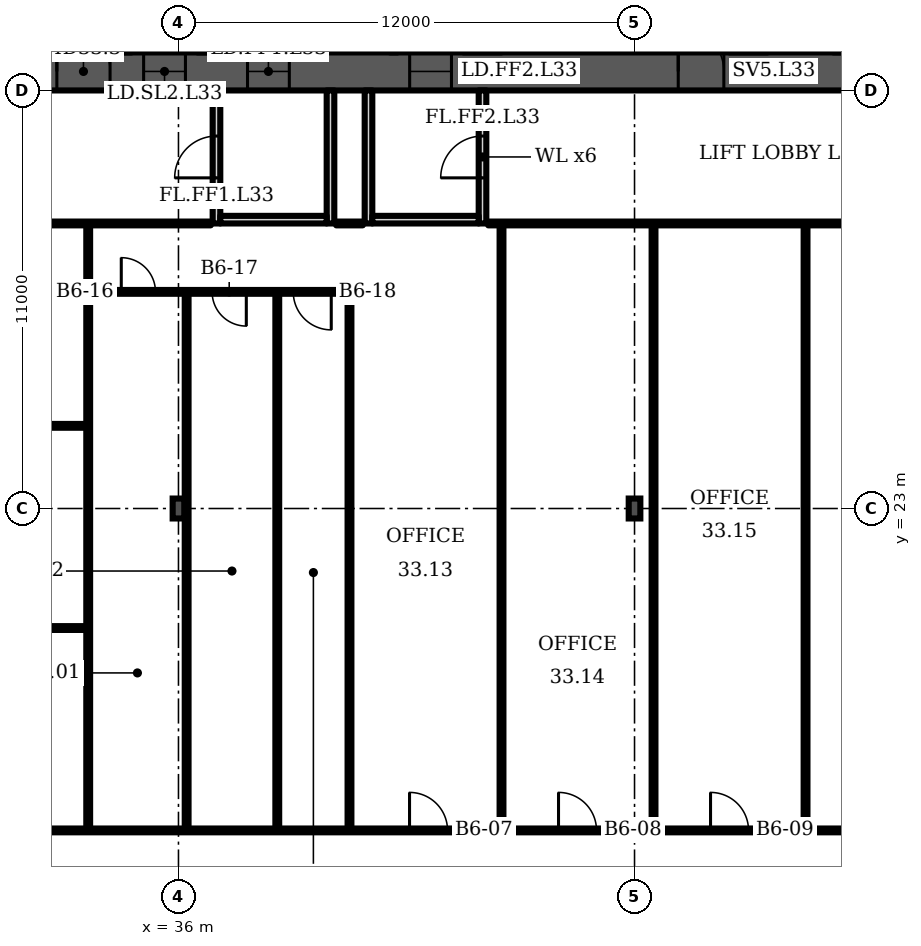
"""IFC4 building model, lengths in metres.
Left out: names, types, materials, properties, quantities, classifications, styles, units other than length and angle.
Written with IfcOpenShell. Run it as: python <this file> out.ifc"""

import sys

from ifc_helpers import new_model, si_unit, direction, frame, frame_2d, origin, origin_2d, place, context, subcontext, project, spatial, rectangle, i_section, extrude, element, fill, save


model = new_model("IFC4")
c1 = context("Model", 3, precision=1e-05, world=origin(), true_north=direction((0.0, 1.0)))
c2 = subcontext(c1, "Body", "Model", "MODEL_VIEW")
j1 = project(units=[si_unit("LENGTHUNIT", "METRE"), si_unit("PLANEANGLEUNIT", "RADIAN")], contexts=[c1])
p1 = place(None, origin())
s1 = spatial("IfcSite", under=j1, at=p1, CompositionType="ELEMENT")
p2 = place(p1, origin())
s2 = spatial("IfcBuilding", under=s1, at=p2, CompositionType="ELEMENT")
p3 = place(p2, frame((0.0, 0.0, 139.9)))
s3 = spatial("IfcBuildingStorey", under=s2, at=p3, CompositionType="ELEMENT", Elevation=139.9)
p4 = place(p3, frame((16.0, 34.5, 0.0), z_axis=(0.0, 0.0, 1.0), x_axis=(1.0, 0.0, 0.0)))
e1 = element("IfcWall", 1, at=p4, inside=s3, PredefinedType="SHEAR", context=c2, shape_type="SweptSolid", body=[
    extrude(rectangle(XDim=49.0, YDim=1.0, at=frame_2d((24.5, 0.0))), origin(), (0.0, 0.0, 1.0), 3.6),
])
p5 = place(p4, frame((1.2, 0.0, 0.0)))
e2 = element("IfcOpeningElement", 2, at=p5, cuts=e1, PredefinedType="OPENING", context=c2, shape_type="SweptSolid", body=[
    extrude(rectangle(XDim=1.1, YDim=2.1, at=frame_2d((0.55, 1.05))), frame((0.0, 0.51, 0.0), z_axis=(0.0, -1.0, 0.0), x_axis=(1.0, 0.0, 0.0)), (0.0, 0.0, 1.0), 1.02),
])
p6 = place(p4, frame((5.083, 0.0, 0.0)))
e3 = element("IfcOpeningElement", 3, at=p6, cuts=e1, PredefinedType="OPENING", context=c2, shape_type="SweptSolid", body=[
    extrude(rectangle(XDim=1.1, YDim=2.1, at=frame_2d((0.55, 1.05))), frame((0.0, 0.51, 0.0), z_axis=(0.0, -1.0, 0.0), x_axis=(1.0, 0.0, 0.0)), (0.0, 0.0, 1.0), 1.02),
])
p7 = place(p4, frame((2.933, 0.0, 0.0)))
e4 = element("IfcOpeningElement", 4, at=p7, cuts=e1, PredefinedType="OPENING", context=c2, shape_type="SweptSolid", body=[
    extrude(rectangle(XDim=1.4, YDim=2.1, at=frame_2d((0.7, 1.05))), frame((0.0, 0.51, 0.0), z_axis=(0.0, -1.0, 0.0), x_axis=(1.0, 0.0, 0.0)), (0.0, 0.0, 1.0), 1.02),
])
p8 = place(p4, frame((7.65, 0.0, 0.0)))
e5 = element("IfcOpeningElement", 5, at=p8, cuts=e1, PredefinedType="OPENING", context=c2, shape_type="SweptSolid", body=[
    extrude(rectangle(XDim=1.2, YDim=2.1, at=frame_2d((0.6, 1.05))), frame((0.0, 0.51, 0.0), z_axis=(0.0, -1.0, 0.0), x_axis=(1.0, 0.0, 0.0)), (0.0, 0.0, 1.0), 1.02),
])
p9 = place(p4, frame((14.817, 0.0, 0.0)))
e6 = element("IfcOpeningElement", 6, at=p9, cuts=e1, PredefinedType="OPENING", context=c2, shape_type="SweptSolid", body=[
    extrude(rectangle(XDim=1.1, YDim=2.1, at=frame_2d((0.55, 1.05))), frame((0.0, 0.51, 0.0), z_axis=(0.0, -1.0, 0.0), x_axis=(1.0, 0.0, 0.0)), (0.0, 0.0, 1.0), 1.02),
])
p10 = place(p4, frame((19.083, 0.0, 0.0)))
e7 = element("IfcOpeningElement", 7, at=p10, cuts=e1, PredefinedType="OPENING", context=c2, shape_type="SweptSolid", body=[
    extrude(rectangle(XDim=1.1, YDim=2.1, at=frame_2d((0.55, 1.05))), frame((0.0, 0.51, 0.0), z_axis=(0.0, -1.0, 0.0), x_axis=(1.0, 0.0, 0.0)), (0.0, 0.0, 1.0), 1.02),
])
p11 = place(p4, frame((16.8, 0.0, 0.0)))
e8 = element("IfcOpeningElement", 8, at=p11, cuts=e1, PredefinedType="OPENING", context=c2, shape_type="SweptSolid", body=[
    extrude(rectangle(XDim=1.4, YDim=2.1, at=frame_2d((0.7, 1.05))), frame((0.0, 0.51, 0.0), z_axis=(0.0, -1.0, 0.0), x_axis=(1.0, 0.0, 0.0)), (0.0, 0.0, 1.0), 1.02),
])
p12 = place(p4, frame((21.817, 0.0, 0.0)))
e9 = element("IfcOpeningElement", 9, at=p12, cuts=e1, PredefinedType="OPENING", context=c2, shape_type="SweptSolid", body=[
    extrude(rectangle(XDim=1.1, YDim=2.1, at=frame_2d((0.55, 1.05))), frame((0.0, 0.51, 0.0), z_axis=(0.0, -1.0, 0.0), x_axis=(1.0, 0.0, 0.0)), (0.0, 0.0, 1.0), 1.02),
])
p13 = place(p4, frame((26.083, 0.0, 0.0)))
e10 = element("IfcOpeningElement", 10, at=p13, cuts=e1, PredefinedType="OPENING", context=c2, shape_type="SweptSolid", body=[
    extrude(rectangle(XDim=1.1, YDim=2.1, at=frame_2d((0.55, 1.05))), frame((0.0, 0.51, 0.0), z_axis=(0.0, -1.0, 0.0), x_axis=(1.0, 0.0, 0.0)), (0.0, 0.0, 1.0), 1.02),
])
p14 = place(p4, frame((33.15, 0.0, 0.0)))
e11 = element("IfcOpeningElement", 11, at=p14, cuts=e1, PredefinedType="OPENING", context=c2, shape_type="SweptSolid", body=[
    extrude(rectangle(XDim=1.2, YDim=2.1, at=frame_2d((0.6, 1.05))), frame((0.0, 0.51, 0.0), z_axis=(0.0, -1.0, 0.0), x_axis=(1.0, 0.0, 0.0)), (0.0, 0.0, 1.0), 1.02),
])
p15 = place(p4, frame((37.8, 0.0, 0.0)))
e12 = element("IfcOpeningElement", 12, at=p15, cuts=e1, PredefinedType="OPENING", context=c2, shape_type="SweptSolid", body=[
    extrude(rectangle(XDim=1.4, YDim=2.1, at=frame_2d((0.7, 1.05))), frame((0.0, 0.51, 0.0), z_axis=(0.0, -1.0, 0.0), x_axis=(1.0, 0.0, 0.0)), (0.0, 0.0, 1.0), 1.02),
])
p16 = place(p4, frame((42.817, 0.0, 0.0)))
e13 = element("IfcOpeningElement", 13, at=p16, cuts=e1, PredefinedType="OPENING", context=c2, shape_type="SweptSolid", body=[
    extrude(rectangle(XDim=1.1, YDim=2.1, at=frame_2d((0.55, 1.05))), frame((0.0, 0.51, 0.0), z_axis=(0.0, -1.0, 0.0), x_axis=(1.0, 0.0, 0.0)), (0.0, 0.0, 1.0), 1.02),
])
p17 = place(p4, frame((46.7, 0.0, 0.0)))
e14 = element("IfcOpeningElement", 14, at=p17, cuts=e1, PredefinedType="OPENING", context=c2, shape_type="SweptSolid", body=[
    extrude(rectangle(XDim=1.1, YDim=2.1, at=frame_2d((0.55, 1.05))), frame((0.0, 0.51, 0.0), z_axis=(0.0, -1.0, 0.0), x_axis=(1.0, 0.0, 0.0)), (0.0, 0.0, 1.0), 1.02),
])
p18 = place(p4, frame((44.667, 0.0, 0.0)))
e15 = element("IfcOpeningElement", 15, at=p18, cuts=e1, PredefinedType="OPENING", context=c2, shape_type="SweptSolid", body=[
    extrude(rectangle(XDim=1.4, YDim=2.1, at=frame_2d((0.7, 1.05))), frame((0.0, 0.51, 0.0), z_axis=(0.0, -1.0, 0.0), x_axis=(1.0, 0.0, 0.0)), (0.0, 0.0, 1.0), 1.02),
])
for number, where, z_axis, x_axis in (
    (16, (36.0, 23.0, 0.0), (0.0, 0.0, 1.0), (1.0, 0.0, 0.0)),
    (17, (48.0, 23.0, 0.0), (0.0, 0.0, 1.0), (1.0, 0.0, 0.0)),
):
    element("IfcColumn", number, at=place(p3, frame(where, z_axis=z_axis, x_axis=x_axis)), inside=s3, PredefinedType="COLUMN", context=c2, shape_type="SweptSolid", body=[
        extrude(i_section(OverallWidth=0.306, OverallDepth=0.524, WebThickness=0.021, FlangeThickness=0.04, FilletRadius=0.027, at=origin_2d()), origin(), (0.0, 0.0, 1.0), 3.6),
    ])
p19 = place(p3, frame((37.0, 30.5, 0.0), z_axis=(0.0, 0.0, 1.0), x_axis=(0.0, 1.0, 0.0)))
e18 = element("IfcWall", 18, at=p19, inside=s3, PredefinedType="PARTITIONING", context=c2, shape_type="SweptSolid", body=[
    extrude(rectangle(XDim=3.5, YDim=0.2, at=frame_2d((1.75, 0.0))), origin(), (0.0, 0.0, 1.0), 3.2),
])
p20 = place(p19, frame((1.2, 0.0, 0.0)))
e19 = element("IfcOpeningElement", 19, at=p20, cuts=e18, PredefinedType="OPENING", context=c2, shape_type="SweptSolid", body=[
    extrude(rectangle(XDim=1.1, YDim=2.1, at=frame_2d((0.55, 1.05))), frame((0.0, 0.11, 0.0), z_axis=(0.0, -1.0, 0.0), x_axis=(1.0, 0.0, 0.0)), (0.0, 0.0, 1.0), 0.22),
])
p21 = place(p3, frame((40.0, 30.5, 0.0), z_axis=(0.0, 0.0, 1.0), x_axis=(0.0, 1.0, 0.0)))
e20 = element("IfcWall", 20, at=p21, inside=s3, PredefinedType="PARTITIONING", context=c2, shape_type="SweptSolid", body=[
    extrude(rectangle(XDim=3.5, YDim=0.2, at=frame_2d((1.75, 0.0))), origin(), (0.0, 0.0, 1.0), 3.2),
])
p22 = place(p3, frame((37.1, 30.6, 0.0), z_axis=(0.0, 0.0, 1.0), x_axis=(1.0, 0.0, 0.0)))
e21 = element("IfcWall", 21, at=p22, inside=s3, PredefinedType="PARTITIONING", context=c2, shape_type="SweptSolid", body=[
    extrude(rectangle(XDim=2.8, YDim=0.2, at=frame_2d((1.4, 0.0))), origin(), (0.0, 0.0, 1.0), 3.2),
])
p23 = place(p3, frame((41.0, 30.5, 0.0), z_axis=(0.0, 0.0, 1.0), x_axis=(0.0, 1.0, 0.0)))
e22 = element("IfcWall", 22, at=p23, inside=s3, PredefinedType="PARTITIONING", context=c2, shape_type="SweptSolid", body=[
    extrude(rectangle(XDim=3.5, YDim=0.2, at=frame_2d((1.75, 0.0))), origin(), (0.0, 0.0, 1.0), 3.2),
])
p24 = place(p3, frame((44.0, 30.5, 0.0), z_axis=(0.0, 0.0, 1.0), x_axis=(0.0, 1.0, 0.0)))
e23 = element("IfcWall", 23, at=p24, inside=s3, PredefinedType="PARTITIONING", context=c2, shape_type="SweptSolid", body=[
    extrude(rectangle(XDim=3.5, YDim=0.2, at=frame_2d((1.75, 0.0))), origin(), (0.0, 0.0, 1.0), 3.2),
])
p25 = place(p24, frame((1.2, 0.0, 0.0)))
e24 = element("IfcOpeningElement", 24, at=p25, cuts=e23, PredefinedType="OPENING", context=c2, shape_type="SweptSolid", body=[
    extrude(rectangle(XDim=1.1, YDim=2.1, at=frame_2d((0.55, 1.05))), frame((0.0, 0.11, 0.0), z_axis=(0.0, -1.0, 0.0), x_axis=(1.0, 0.0, 0.0)), (0.0, 0.0, 1.0), 0.22),
])
p26 = place(p3, frame((41.1, 30.6, 0.0), z_axis=(0.0, 0.0, 1.0), x_axis=(1.0, 0.0, 0.0)))
e25 = element("IfcWall", 25, at=p26, inside=s3, PredefinedType="PARTITIONING", context=c2, shape_type="SweptSolid", body=[
    extrude(rectangle(XDim=2.8, YDim=0.2, at=frame_2d((1.4, 0.0))), origin(), (0.0, 0.0, 1.0), 3.2),
])
p27 = place(p3, frame((17.8, 25.175, 0.0), z_axis=(0.0, 0.0, 1.0), x_axis=(1.0, 0.0, 0.0)))
e26 = element("IfcWall", 26, at=p27, inside=s3, PredefinedType="PARTITIONING", context=c2, shape_type="SweptSolid", body=[
    extrude(rectangle(XDim=15.825, YDim=0.1, at=frame_2d((7.913, 0.0))), origin(), (0.0, 0.0, 1.0), 3.2),
])
p28 = place(p3, frame((17.8, 30.5, 0.0), z_axis=(0.0, 0.0, 1.0), x_axis=(1.0, 0.0, 0.0)))
e27 = element("IfcWall", 27, at=p28, inside=s3, PredefinedType="PARTITIONING", context=c2, shape_type="SweptSolid", body=[
    extrude(rectangle(XDim=19.05, YDim=0.1, at=frame_2d((9.525, 0.0))), origin(), (0.0, 0.0, 1.0), 3.2),
])
p29 = place(p28, frame((7.5, 0.0, 0.0)))
e28 = element("IfcOpeningElement", 28, at=p29, cuts=e27, PredefinedType="OPENING", context=c2, shape_type="SweptSolid", body=[
    extrude(rectangle(XDim=1.0, YDim=2.1, at=frame_2d((0.5, 1.05))), frame((0.0, 0.06, 0.0), z_axis=(0.0, -1.0, 0.0), x_axis=(1.0, 0.0, 0.0)), (0.0, 0.0, 1.0), 0.12),
])
p30 = place(p3, frame((18.2, 14.53, 0.0), z_axis=(0.0, 0.0, 1.0), x_axis=(1.0, 0.0, 0.0)))
e29 = element("IfcWall", 29, at=p30, inside=s3, PredefinedType="PARTITIONING", context=c2, shape_type="SweptSolid", body=[
    extrude(rectangle(XDim=68.41, YDim=0.1, at=frame_2d((34.205, 0.0))), origin(), (0.0, 0.0, 1.0), 3.2),
])
p31 = place(p30, frame((4.605, 0.0, 0.0)))
e30 = element("IfcOpeningElement", 30, at=p31, cuts=e29, PredefinedType="OPENING", context=c2, shape_type="SweptSolid", body=[
    extrude(rectangle(XDim=1.0, YDim=2.1, at=frame_2d((0.5, 1.05))), frame((0.0, 0.06, 0.0), z_axis=(0.0, -1.0, 0.0), x_axis=(1.0, 0.0, 0.0)), (0.0, 0.0, 1.0), 0.12),
])
p32 = place(p30, frame((23.88, 0.0, 0.0)))
e31 = element("IfcOpeningElement", 31, at=p32, cuts=e29, PredefinedType="OPENING", context=c2, shape_type="SweptSolid", body=[
    extrude(rectangle(XDim=1.0, YDim=2.1, at=frame_2d((0.5, 1.05))), frame((0.0, 0.06, 0.0), z_axis=(0.0, -1.0, 0.0), x_axis=(1.0, 0.0, 0.0)), (0.0, 0.0, 1.0), 0.12),
])
p33 = place(p30, frame((27.8, 0.0, 0.0)))
e32 = element("IfcOpeningElement", 32, at=p33, cuts=e29, PredefinedType="OPENING", context=c2, shape_type="SweptSolid", body=[
    extrude(rectangle(XDim=1.0, YDim=2.1, at=frame_2d((0.5, 1.05))), frame((0.0, 0.06, 0.0), z_axis=(0.0, -1.0, 0.0), x_axis=(1.0, 0.0, 0.0)), (0.0, 0.0, 1.0), 0.12),
])
p34 = place(p30, frame((31.8, 0.0, 0.0)))
e33 = element("IfcOpeningElement", 33, at=p34, cuts=e29, PredefinedType="OPENING", context=c2, shape_type="SweptSolid", body=[
    extrude(rectangle(XDim=1.0, YDim=2.1, at=frame_2d((0.5, 1.05))), frame((0.0, 0.06, 0.0), z_axis=(0.0, -1.0, 0.0), x_axis=(1.0, 0.0, 0.0)), (0.0, 0.0, 1.0), 0.12),
])
p35 = place(p30, frame((35.8, 0.0, 0.0)))
e34 = element("IfcOpeningElement", 34, at=p35, cuts=e29, PredefinedType="OPENING", context=c2, shape_type="SweptSolid", body=[
    extrude(rectangle(XDim=1.0, YDim=2.1, at=frame_2d((0.5, 1.05))), frame((0.0, 0.06, 0.0), z_axis=(0.0, -1.0, 0.0), x_axis=(1.0, 0.0, 0.0)), (0.0, 0.0, 1.0), 0.12),
])
p36 = place(p30, frame((41.355, 0.0, 0.0)))
e35 = element("IfcOpeningElement", 35, at=p36, cuts=e29, PredefinedType="OPENING", context=c2, shape_type="SweptSolid", body=[
    extrude(rectangle(XDim=1.0, YDim=2.1, at=frame_2d((0.5, 1.05))), frame((0.0, 0.06, 0.0), z_axis=(0.0, -1.0, 0.0), x_axis=(1.0, 0.0, 0.0)), (0.0, 0.0, 1.0), 0.12),
])
p37 = place(p30, frame((50.88, 0.0, 0.0)))
e36 = element("IfcOpeningElement", 36, at=p37, cuts=e29, PredefinedType="OPENING", context=c2, shape_type="SweptSolid", body=[
    extrude(rectangle(XDim=1.8, YDim=2.1, at=frame_2d((0.9, 1.05))), frame((0.0, 0.06, 0.0), z_axis=(0.0, -1.0, 0.0), x_axis=(1.0, 0.0, 0.0)), (0.0, 0.0, 1.0), 0.12),
])
p38 = place(p30, frame((62.796, 0.0, 0.0)))
e37 = element("IfcOpeningElement", 37, at=p38, cuts=e29, PredefinedType="OPENING", context=c2, shape_type="SweptSolid", body=[
    extrude(rectangle(XDim=1.0, YDim=2.1, at=frame_2d((0.5, 1.05))), frame((0.0, 0.06, 0.0), z_axis=(0.0, -1.0, 0.0), x_axis=(1.0, 0.0, 0.0)), (0.0, 0.0, 1.0), 0.12),
])
p39 = place(p3, frame((18.2, 19.855, 0.0), z_axis=(0.0, 0.0, 1.0), x_axis=(1.0, 0.0, 0.0)))
e38 = element("IfcWall", 38, at=p39, inside=s3, PredefinedType="PARTITIONING", context=c2, shape_type="SweptSolid", body=[
    extrude(rectangle(XDim=15.425, YDim=0.1, at=frame_2d((7.712, 0.0))), origin(), (0.0, 0.0, 1.0), 3.2),
])
p40 = place(p3, frame((33.625, 14.53, 0.0), z_axis=(0.0, 0.0, 1.0), x_axis=(0.0, 1.0, 0.0)))
e39 = element("IfcWall", 39, at=p40, inside=s3, PredefinedType="PARTITIONING", context=c2, shape_type="SweptSolid", body=[
    extrude(rectangle(XDim=15.96, YDim=0.1, at=frame_2d((7.98, 0.0))), origin(), (0.0, 0.0, 1.0), 3.2),
])
p41 = place(p3, frame((33.625, 28.7, 0.0), z_axis=(0.0, 0.0, 1.0), x_axis=(1.0, 0.0, 0.0)))
e40 = element("IfcWall", 40, at=p41, inside=s3, PredefinedType="PARTITIONING", context=c2, shape_type="SweptSolid", body=[
    extrude(rectangle(XDim=6.875, YDim=0.1, at=frame_2d((3.438, 0.0))), origin(), (0.0, 0.0, 1.0), 3.2),
])
p42 = place(p41, frame((0.87, 0.0, 0.0)))
e41 = element("IfcOpeningElement", 41, at=p42, cuts=e40, PredefinedType="OPENING", context=c2, shape_type="SweptSolid", body=[
    extrude(rectangle(XDim=0.9, YDim=2.1, at=frame_2d((0.45, 1.05))), frame((0.0, 0.06, 0.0), z_axis=(0.0, -1.0, 0.0), x_axis=(1.0, 0.0, 0.0)), (0.0, 0.0, 1.0), 0.12),
])
p43 = place(p41, frame((3.26, 0.0, 0.0)))
e42 = element("IfcOpeningElement", 42, at=p43, cuts=e40, PredefinedType="OPENING", context=c2, shape_type="SweptSolid", body=[
    extrude(rectangle(XDim=0.9, YDim=2.1, at=frame_2d((0.45, 1.05))), frame((0.0, 0.06, 0.0), z_axis=(0.0, -1.0, 0.0), x_axis=(1.0, 0.0, 0.0)), (0.0, 0.0, 1.0), 0.12),
])
p44 = place(p41, frame((5.395, 0.0, 0.0)))
e43 = element("IfcOpeningElement", 43, at=p44, cuts=e40, PredefinedType="OPENING", context=c2, shape_type="SweptSolid", body=[
    extrude(rectangle(XDim=1.0, YDim=2.1, at=frame_2d((0.5, 1.05))), frame((0.0, 0.06, 0.0), z_axis=(0.0, -1.0, 0.0), x_axis=(1.0, 0.0, 0.0)), (0.0, 0.0, 1.0), 0.12),
])
for number, where, z_axis, x_axis in (
    (44, (36.215, 14.53, 0.0), (0.0, 0.0, 1.0), (0.0, 1.0, 0.0)),
    (45, (38.6, 14.53, 0.0), (0.0, 0.0, 1.0), (0.0, 1.0, 0.0)),
    (46, (40.5, 14.53, 0.0), (0.0, 0.0, 1.0), (0.0, 1.0, 0.0)),
):
    element("IfcWall", number, at=place(p3, frame(where, z_axis=z_axis, x_axis=x_axis)), inside=s3, PredefinedType="PARTITIONING", context=c2, shape_type="SweptSolid", body=[
        extrude(rectangle(XDim=14.17, YDim=0.1, at=frame_2d((7.085, 0.0))), origin(), (0.0, 0.0, 1.0), 3.2),
    ])
for number, where, z_axis, x_axis in (
    (47, (44.5, 14.53, 0.0), (0.0, 0.0, 1.0), (0.0, 1.0, 0.0)),
    (48, (48.5, 14.53, 0.0), (0.0, 0.0, 1.0), (0.0, 1.0, 0.0)),
    (49, (52.5, 14.53, 0.0), (0.0, 0.0, 1.0), (0.0, 1.0, 0.0)),
):
    element("IfcWall", number, at=place(p3, frame(where, z_axis=z_axis, x_axis=x_axis)), inside=s3, PredefinedType="PARTITIONING", context=c2, shape_type="SweptSolid", body=[
        extrude(rectangle(XDim=15.97, YDim=0.1, at=frame_2d((7.985, 0.0))), origin(), (0.0, 0.0, 1.0), 3.2),
    ])
p45 = place(p3, frame((40.15, 30.5, 0.0), z_axis=(0.0, 0.0, 1.0), x_axis=(1.0, 0.0, 0.0)))
e50 = element("IfcWall", 50, at=p45, inside=s3, PredefinedType="PARTITIONING", context=c2, shape_type="SweptSolid", body=[
    extrude(rectangle(XDim=0.7, YDim=0.1, at=frame_2d((0.35, 0.0))), origin(), (0.0, 0.0, 1.0), 3.2),
])
p46 = place(p3, frame((44.15, 30.5, 0.0), z_axis=(0.0, 0.0, 1.0), x_axis=(1.0, 0.0, 0.0)))
e51 = element("IfcWall", 51, at=p46, inside=s3, PredefinedType="PARTITIONING", context=c2, shape_type="SweptSolid", body=[
    extrude(rectangle(XDim=19.425, YDim=0.1, at=frame_2d((9.712, 0.0))), origin(), (0.0, 0.0, 1.0), 3.2),
])
p47 = place(p10, origin())
e52 = element("IfcDoor", 52, at=p47, inside=s3, OperationType="DOUBLE_DOOR_SLIDING", PredefinedType="DOOR", context=c2, shape_type="SweptSolid", body=[
    extrude(rectangle(XDim=1.1, YDim=2.1, at=frame_2d((0.55, 1.05))), frame((0.0, 0.025, 0.0), z_axis=(0.0, -1.0, 0.0), x_axis=(1.0, 0.0, 0.0)), (0.0, 0.0, 1.0), 0.05),
])
fill(e7, e52)
p48 = place(p11, origin())
e53 = element("IfcDoor", 53, at=p48, inside=s3, OperationType="DOUBLE_DOOR_SINGLE_SWING", PredefinedType="DOOR", context=c2, shape_type="SweptSolid", body=[
    extrude(rectangle(XDim=1.4, YDim=2.1, at=frame_2d((0.7, 1.05))), frame((0.0, 0.025, 0.0), z_axis=(0.0, -1.0, 0.0), x_axis=(1.0, 0.0, 0.0)), (0.0, 0.0, 1.0), 0.05),
])
fill(e8, e53)
p49 = place(p12, origin())
e54 = element("IfcDoor", 54, at=p49, inside=s3, OperationType="DOUBLE_DOOR_SLIDING", PredefinedType="DOOR", context=c2, shape_type="SweptSolid", body=[
    extrude(rectangle(XDim=1.1, YDim=2.1, at=frame_2d((0.55, 1.05))), frame((0.0, 0.025, 0.0), z_axis=(0.0, -1.0, 0.0), x_axis=(1.0, 0.0, 0.0)), (0.0, 0.0, 1.0), 0.05),
])
fill(e9, e54)
p50 = place(p13, origin())
e55 = element("IfcDoor", 55, at=p50, inside=s3, OperationType="DOUBLE_DOOR_SLIDING", PredefinedType="DOOR", context=c2, shape_type="SweptSolid", body=[
    extrude(rectangle(XDim=1.1, YDim=2.1, at=frame_2d((0.55, 1.05))), frame((0.0, 0.025, 0.0), z_axis=(0.0, -1.0, 0.0), x_axis=(1.0, 0.0, 0.0)), (0.0, 0.0, 1.0), 0.05),
])
fill(e10, e55)
p51 = place(p14, origin())
e56 = element("IfcDoor", 56, at=p51, inside=s3, OperationType="SINGLE_SWING_LEFT", PredefinedType="DOOR", context=c2, shape_type="SweptSolid", body=[
    extrude(rectangle(XDim=1.2, YDim=2.1, at=frame_2d((0.6, 1.05))), frame((0.0, 0.025, 0.0), z_axis=(0.0, -1.0, 0.0), x_axis=(1.0, 0.0, 0.0)), (0.0, 0.0, 1.0), 0.05),
])
fill(e11, e56)
p52 = place(p20, origin())
e57 = element("IfcDoor", 57, at=p52, inside=s3, OperationType="SINGLE_SWING_LEFT", PredefinedType="DOOR", context=c2, shape_type="SweptSolid", body=[
    extrude(rectangle(XDim=1.1, YDim=2.1, at=frame_2d((0.55, 1.05))), frame((0.0, 0.025, 0.0), z_axis=(0.0, -1.0, 0.0), x_axis=(1.0, 0.0, 0.0)), (0.0, 0.0, 1.0), 0.05),
])
fill(e19, e57)
p53 = place(p25, origin())
e58 = element("IfcDoor", 58, at=p53, inside=s3, OperationType="SINGLE_SWING_LEFT", PredefinedType="DOOR", context=c2, shape_type="SweptSolid", body=[
    extrude(rectangle(XDim=1.1, YDim=2.1, at=frame_2d((0.55, 1.05))), frame((0.0, 0.025, 0.0), z_axis=(0.0, -1.0, 0.0), x_axis=(1.0, 0.0, 0.0)), (0.0, 0.0, 1.0), 0.05),
])
fill(e24, e58)
p54 = place(p32, origin())
e59 = element("IfcDoor", 59, at=p54, inside=s3, OperationType="SINGLE_SWING_LEFT", PredefinedType="DOOR", context=c2, shape_type="SweptSolid", body=[
    extrude(rectangle(XDim=1.0, YDim=2.1, at=frame_2d((0.5, 1.05))), frame((0.0, 0.025, 0.0), z_axis=(0.0, -1.0, 0.0), x_axis=(1.0, 0.0, 0.0)), (0.0, 0.0, 1.0), 0.05),
])
fill(e31, e59)
p55 = place(p33, origin())
e60 = element("IfcDoor", 60, at=p55, inside=s3, OperationType="SINGLE_SWING_LEFT", PredefinedType="DOOR", context=c2, shape_type="SweptSolid", body=[
    extrude(rectangle(XDim=1.0, YDim=2.1, at=frame_2d((0.5, 1.05))), frame((0.0, 0.025, 0.0), z_axis=(0.0, -1.0, 0.0), x_axis=(1.0, 0.0, 0.0)), (0.0, 0.0, 1.0), 0.05),
])
fill(e32, e60)
p56 = place(p34, origin())
e61 = element("IfcDoor", 61, at=p56, inside=s3, OperationType="SINGLE_SWING_LEFT", PredefinedType="DOOR", context=c2, shape_type="SweptSolid", body=[
    extrude(rectangle(XDim=1.0, YDim=2.1, at=frame_2d((0.5, 1.05))), frame((0.0, 0.025, 0.0), z_axis=(0.0, -1.0, 0.0), x_axis=(1.0, 0.0, 0.0)), (0.0, 0.0, 1.0), 0.05),
])
fill(e33, e61)
p57 = place(p42, origin())
e62 = element("IfcDoor", 62, at=p57, inside=s3, OperationType="SINGLE_SWING_LEFT", PredefinedType="DOOR", context=c2, shape_type="SweptSolid", body=[
    extrude(rectangle(XDim=0.9, YDim=2.1, at=frame_2d((0.45, 1.05))), frame((0.0, 0.025, 0.0), z_axis=(0.0, -1.0, 0.0), x_axis=(1.0, 0.0, 0.0)), (0.0, 0.0, 1.0), 0.05),
])
fill(e41, e62)
p58 = place(p43, origin())
e63 = element("IfcDoor", 63, at=p58, inside=s3, OperationType="SINGLE_SWING_RIGHT", PredefinedType="DOOR", context=c2, shape_type="SweptSolid", body=[
    extrude(rectangle(XDim=0.9, YDim=2.1, at=frame_2d((0.45, 1.05))), frame((0.0, 0.025, 0.0), z_axis=(0.0, -1.0, 0.0), x_axis=(1.0, 0.0, 0.0)), (0.0, 0.0, 1.0), 0.05),
])
fill(e42, e63)
p59 = place(p44, origin())
e64 = element("IfcDoor", 64, at=p59, inside=s3, OperationType="SINGLE_SWING_RIGHT", PredefinedType="DOOR", context=c2, shape_type="SweptSolid", body=[
    extrude(rectangle(XDim=1.0, YDim=2.1, at=frame_2d((0.5, 1.05))), frame((0.0, 0.025, 0.0), z_axis=(0.0, -1.0, 0.0), x_axis=(1.0, 0.0, 0.0)), (0.0, 0.0, 1.0), 0.05),
])
fill(e43, e64)
save(model, sys.argv[1])
